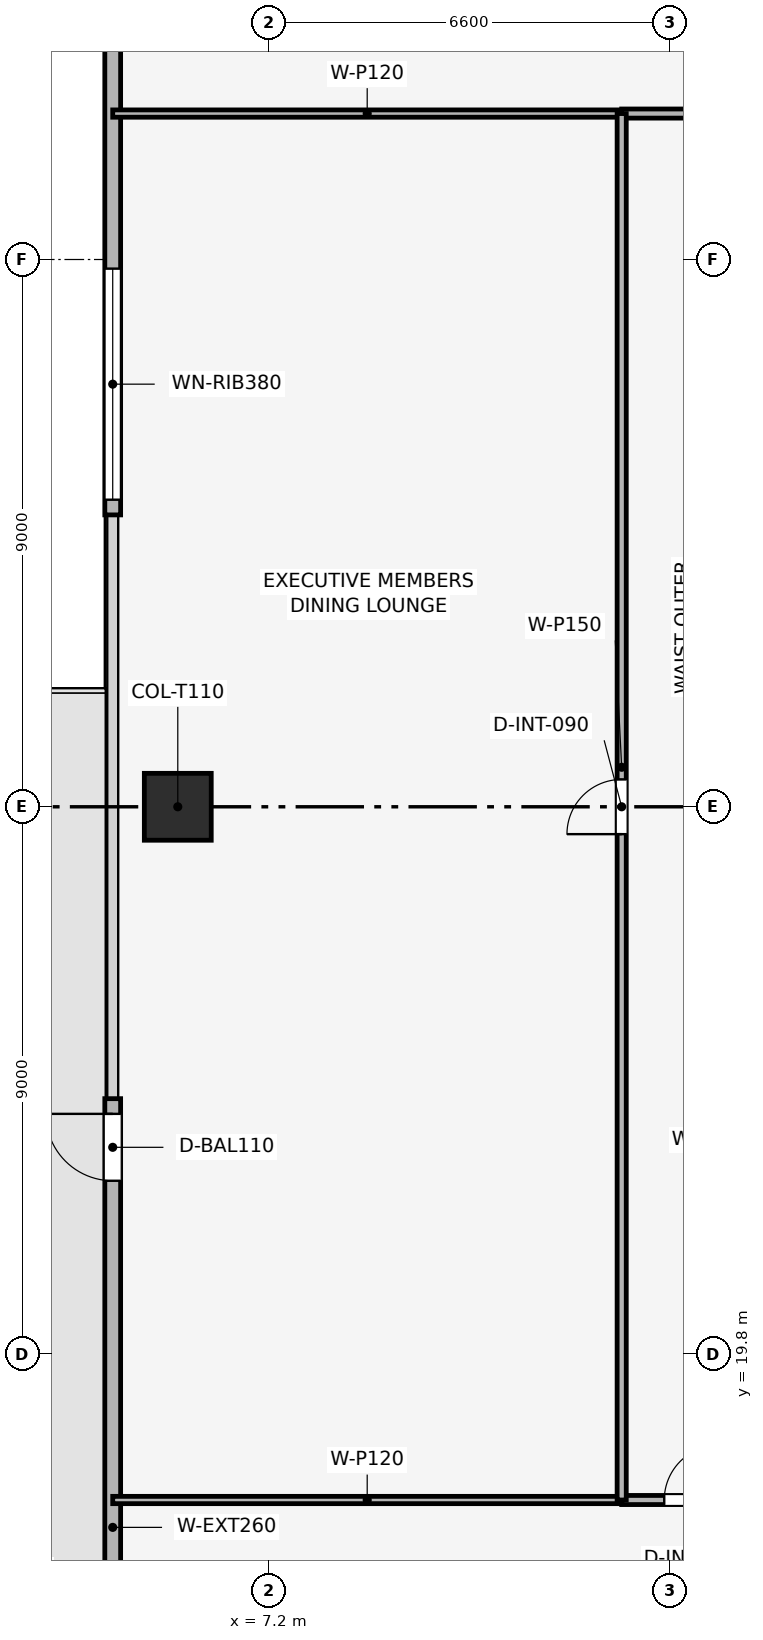
"""IFC4 building model, lengths in metres.
Left out: names, types, materials, properties, quantities, classifications, styles, units other than length and angle.
Written with IfcOpenShell. Run it as: python <this file> out.ifc"""

import sys

from ifc_helpers import new_model, si_unit, direction, frame, frame_2d, origin, origin_2d, place, context, subcontext, project, spatial, rectangle, extrude, element, fill, save


model = new_model("IFC4")
c1 = context("Model", 3, precision=1e-05, world=origin(), true_north=direction((0.0, 1.0)))
c2 = subcontext(c1, "Body", "Model", "MODEL_VIEW")
j1 = project(units=[si_unit("LENGTHUNIT", "METRE"), si_unit("PLANEANGLEUNIT", "RADIAN")], contexts=[c1])
p1 = place(None, origin())
s1 = spatial("IfcSite", under=j1, at=p1, CompositionType="ELEMENT")
p2 = place(p1, origin())
s2 = spatial("IfcBuilding", under=s1, at=p2, CompositionType="ELEMENT")
p3 = place(p2, frame((0.0, 0.0, 168.3)))
s3 = spatial("IfcBuildingStorey", under=s2, at=p3, CompositionType="ELEMENT", Elevation=168.3)
p4 = place(p3, frame((5.7, 28.8, 0.003), z_axis=(0.0, 0.0, 1.0), x_axis=(1.0, 0.0, 0.0)))
e1 = element("IfcColumn", 1, at=p4, inside=s3, PredefinedType="COLUMN", context=c2, shape_type="SweptSolid", body=[
    extrude(rectangle(XDim=1.1, YDim=1.1, at=origin_2d()), origin(), (0.0, 0.0, 1.0), 3.489),
])
p5 = place(p3, frame((4.63, 11.4, 0.0), z_axis=(0.0, 0.0, 1.0), x_axis=(0.0, 1.0, 0.0)))
e2 = element("IfcWall", 2, at=p5, inside=s3, PredefinedType="SOLIDWALL", context=c2, shape_type="SweptSolid", body=[
    extrude(rectangle(XDim=12.6, YDim=0.26, at=frame_2d((6.3, 0.0))), origin(), (0.0, 0.0, 1.0), 3.495),
])
p6 = place(p5, frame((11.25, 0.0, 0.0)))
e3 = element("IfcOpeningElement", 3, at=p6, cuts=e2, PredefinedType="OPENING", context=c2, shape_type="SweptSolid", body=[
    extrude(rectangle(XDim=1.1, YDim=2.2, at=frame_2d((0.55, 1.1))), frame((0.0, 0.14, 0.0), z_axis=(0.0, -1.0, 0.0), x_axis=(1.0, 0.0, 0.0)), (0.0, 0.0, 1.0), 0.28),
])
p7 = place(p3, frame((4.63, 33.6, 0.0), z_axis=(0.0, 0.0, 1.0), x_axis=(0.0, 1.0, 0.0)))
e4 = element("IfcWall", 4, at=p7, inside=s3, PredefinedType="SOLIDWALL", context=c2, shape_type="SweptSolid", body=[
    extrude(rectangle(XDim=12.6, YDim=0.26, at=frame_2d((6.3, 0.0))), origin(), (0.0, 0.0, 1.0), 3.495),
])
p8 = place(p7, frame((0.25, 0.0, 0.9)))
e5 = element("IfcOpeningElement", 5, at=p8, cuts=e4, PredefinedType="OPENING", context=c2, shape_type="SweptSolid", body=[
    extrude(rectangle(XDim=3.8, YDim=1.9, at=frame_2d((1.9, 0.95))), frame((0.0, 0.14, 0.0), z_axis=(0.0, -1.0, 0.0), x_axis=(1.0, 0.0, 0.0)), (0.0, 0.0, 1.0), 0.28),
])
for number, where, z_axis, x_axis in (
    (6, (4.63, 17.4, 0.0), (0.0, 0.0, 1.0), (1.0, 0.0, 0.0)),
    (7, (4.63, 40.2, 0.0), (0.0, 0.0, 1.0), (1.0, 0.0, 0.0)),
):
    element("IfcWall", number, at=place(p3, frame(where, z_axis=z_axis, x_axis=x_axis)), inside=s3, PredefinedType="PARTITIONING", context=c2, shape_type="SweptSolid", body=[
        extrude(rectangle(XDim=8.37, YDim=0.12, at=frame_2d((4.185, 0.0))), origin(), (0.0, 0.0, 1.0), 2.98),
    ])
p9 = place(p3, frame((13.0, 17.4, 0.0), z_axis=(0.0, 0.0, 1.0), x_axis=(1.0, 0.0, 0.0)))
e8 = element("IfcWall", 8, at=p9, inside=s3, PredefinedType="PARTITIONING", context=c2, shape_type="SweptSolid", body=[
    extrude(rectangle(XDim=31.6, YDim=0.15, at=frame_2d((15.8, 0.0))), origin(), (0.0, 0.0, 1.0), 3.03),
])
p10 = place(p9, frame((0.7, 0.0, 0.0)))
e9 = element("IfcOpeningElement", 9, at=p10, cuts=e8, PredefinedType="OPENING", context=c2, shape_type="SweptSolid", body=[
    extrude(rectangle(XDim=0.9, YDim=2.1, at=frame_2d((0.45, 1.05))), frame((0.0, 0.085, 0.0), z_axis=(0.0, -1.0, 0.0), x_axis=(1.0, 0.0, 0.0)), (0.0, 0.0, 1.0), 0.17),
])
p11 = place(p9, frame((6.227, 0.0, 0.0)))
e10 = element("IfcOpeningElement", 10, at=p11, cuts=e8, PredefinedType="OPENING", context=c2, shape_type="SweptSolid", body=[
    extrude(rectangle(XDim=0.9, YDim=2.1, at=frame_2d((0.45, 1.05))), frame((0.0, 0.085, 0.0), z_axis=(0.0, -1.0, 0.0), x_axis=(1.0, 0.0, 0.0)), (0.0, 0.0, 1.0), 0.17),
])
p12 = place(p9, frame((15.279, 0.0, 0.0)))
e11 = element("IfcOpeningElement", 11, at=p12, cuts=e8, PredefinedType="OPENING", context=c2, shape_type="SweptSolid", body=[
    extrude(rectangle(XDim=0.9, YDim=2.1, at=frame_2d((0.45, 1.05))), frame((0.0, 0.085, 0.0), z_axis=(0.0, -1.0, 0.0), x_axis=(1.0, 0.0, 0.0)), (0.0, 0.0, 1.0), 0.17),
])
p13 = place(p9, frame((25.552, 0.0, 0.0)))
e12 = element("IfcOpeningElement", 12, at=p13, cuts=e8, PredefinedType="OPENING", context=c2, shape_type="SweptSolid", body=[
    extrude(rectangle(XDim=0.9, YDim=2.1, at=frame_2d((0.45, 1.05))), frame((0.0, 0.085, 0.0), z_axis=(0.0, -1.0, 0.0), x_axis=(1.0, 0.0, 0.0)), (0.0, 0.0, 1.0), 0.17),
])
p14 = place(p3, frame((13.0, 40.2, 0.0), z_axis=(0.0, 0.0, 1.0), x_axis=(1.0, 0.0, 0.0)))
e13 = element("IfcWall", 13, at=p14, inside=s3, PredefinedType="PARTITIONING", context=c2, shape_type="SweptSolid", body=[
    extrude(rectangle(XDim=31.6, YDim=0.15, at=frame_2d((15.8, 0.0))), origin(), (0.0, 0.0, 1.0), 3.03),
])
p15 = place(p14, frame((8.395, 0.0, 0.0)))
e14 = element("IfcOpeningElement", 14, at=p15, cuts=e13, PredefinedType="OPENING", context=c2, shape_type="SweptSolid", body=[
    extrude(rectangle(XDim=0.9, YDim=2.1, at=frame_2d((0.45, 1.05))), frame((0.0, 0.085, 0.0), z_axis=(0.0, -1.0, 0.0), x_axis=(1.0, 0.0, 0.0)), (0.0, 0.0, 1.0), 0.17),
])
p16 = place(p14, frame((24.195, 0.0, 0.0)))
e15 = element("IfcOpeningElement", 15, at=p16, cuts=e13, PredefinedType="OPENING", context=c2, shape_type="SweptSolid", body=[
    extrude(rectangle(XDim=0.9, YDim=2.1, at=frame_2d((0.45, 1.05))), frame((0.0, 0.085, 0.0), z_axis=(0.0, -1.0, 0.0), x_axis=(1.0, 0.0, 0.0)), (0.0, 0.0, 1.0), 0.17),
])
p17 = place(p3, frame((13.0, 17.4, 0.0), z_axis=(0.0, 0.0, 1.0), x_axis=(0.0, 1.0, 0.0)))
e16 = element("IfcWall", 16, at=p17, inside=s3, PredefinedType="PARTITIONING", context=c2, shape_type="SweptSolid", body=[
    extrude(rectangle(XDim=22.8, YDim=0.15, at=frame_2d((11.4, 0.0))), origin(), (0.0, 0.0, 1.0), 3.03),
])
p18 = place(p17, frame((10.95, 0.0, 0.0)))
e17 = element("IfcOpeningElement", 17, at=p18, cuts=e16, PredefinedType="OPENING", context=c2, shape_type="SweptSolid", body=[
    extrude(rectangle(XDim=0.9, YDim=2.1, at=frame_2d((0.45, 1.05))), frame((0.0, 0.085, 0.0), z_axis=(0.0, -1.0, 0.0), x_axis=(1.0, 0.0, 0.0)), (0.0, 0.0, 1.0), 0.17),
])
p19 = place(p6, origin())
e18 = element("IfcDoor", 18, at=p19, inside=s3, OperationType="SINGLE_SWING_RIGHT", PredefinedType="DOOR", context=c2, shape_type="SweptSolid", body=[
    extrude(rectangle(XDim=1.1, YDim=2.2, at=frame_2d((0.55, 1.1))), frame((0.0, 0.025, 0.0), z_axis=(0.0, -1.0, 0.0), x_axis=(1.0, 0.0, 0.0)), (0.0, 0.0, 1.0), 0.05),
])
fill(e3, e18)
p20 = place(p8, origin())
e19 = element("IfcWindow", 19, at=p20, inside=s3, PartitioningType="SINGLE_PANEL", PredefinedType="WINDOW", context=c2, shape_type="SweptSolid", body=[
    extrude(rectangle(XDim=3.8, YDim=1.9, at=frame_2d((1.9, 0.95))), frame((0.0, 0.03, 0.0), z_axis=(0.0, -1.0, 0.0), x_axis=(1.0, 0.0, 0.0)), (0.0, 0.0, 1.0), 0.06),
])
fill(e5, e19)
p21 = place(p10, origin())
e20 = element("IfcDoor", 20, at=p21, inside=s3, OperationType="SINGLE_SWING_RIGHT", PredefinedType="DOOR", context=c2, shape_type="SweptSolid", body=[
    extrude(rectangle(XDim=0.9, YDim=2.1, at=frame_2d((0.45, 1.05))), frame((0.0, 0.025, 0.0), z_axis=(0.0, -1.0, 0.0), x_axis=(1.0, 0.0, 0.0)), (0.0, 0.0, 1.0), 0.05),
])
fill(e9, e20)
p22 = place(p18, origin())
e21 = element("IfcDoor", 21, at=p22, inside=s3, OperationType="SINGLE_SWING_LEFT", PredefinedType="DOOR", context=c2, shape_type="SweptSolid", body=[
    extrude(rectangle(XDim=0.9, YDim=2.1, at=frame_2d((0.45, 1.05))), frame((0.0, 0.025, 0.0), z_axis=(0.0, -1.0, 0.0), x_axis=(1.0, 0.0, 0.0)), (0.0, 0.0, 1.0), 0.05),
])
fill(e17, e21)
save(model, sys.argv[1])
